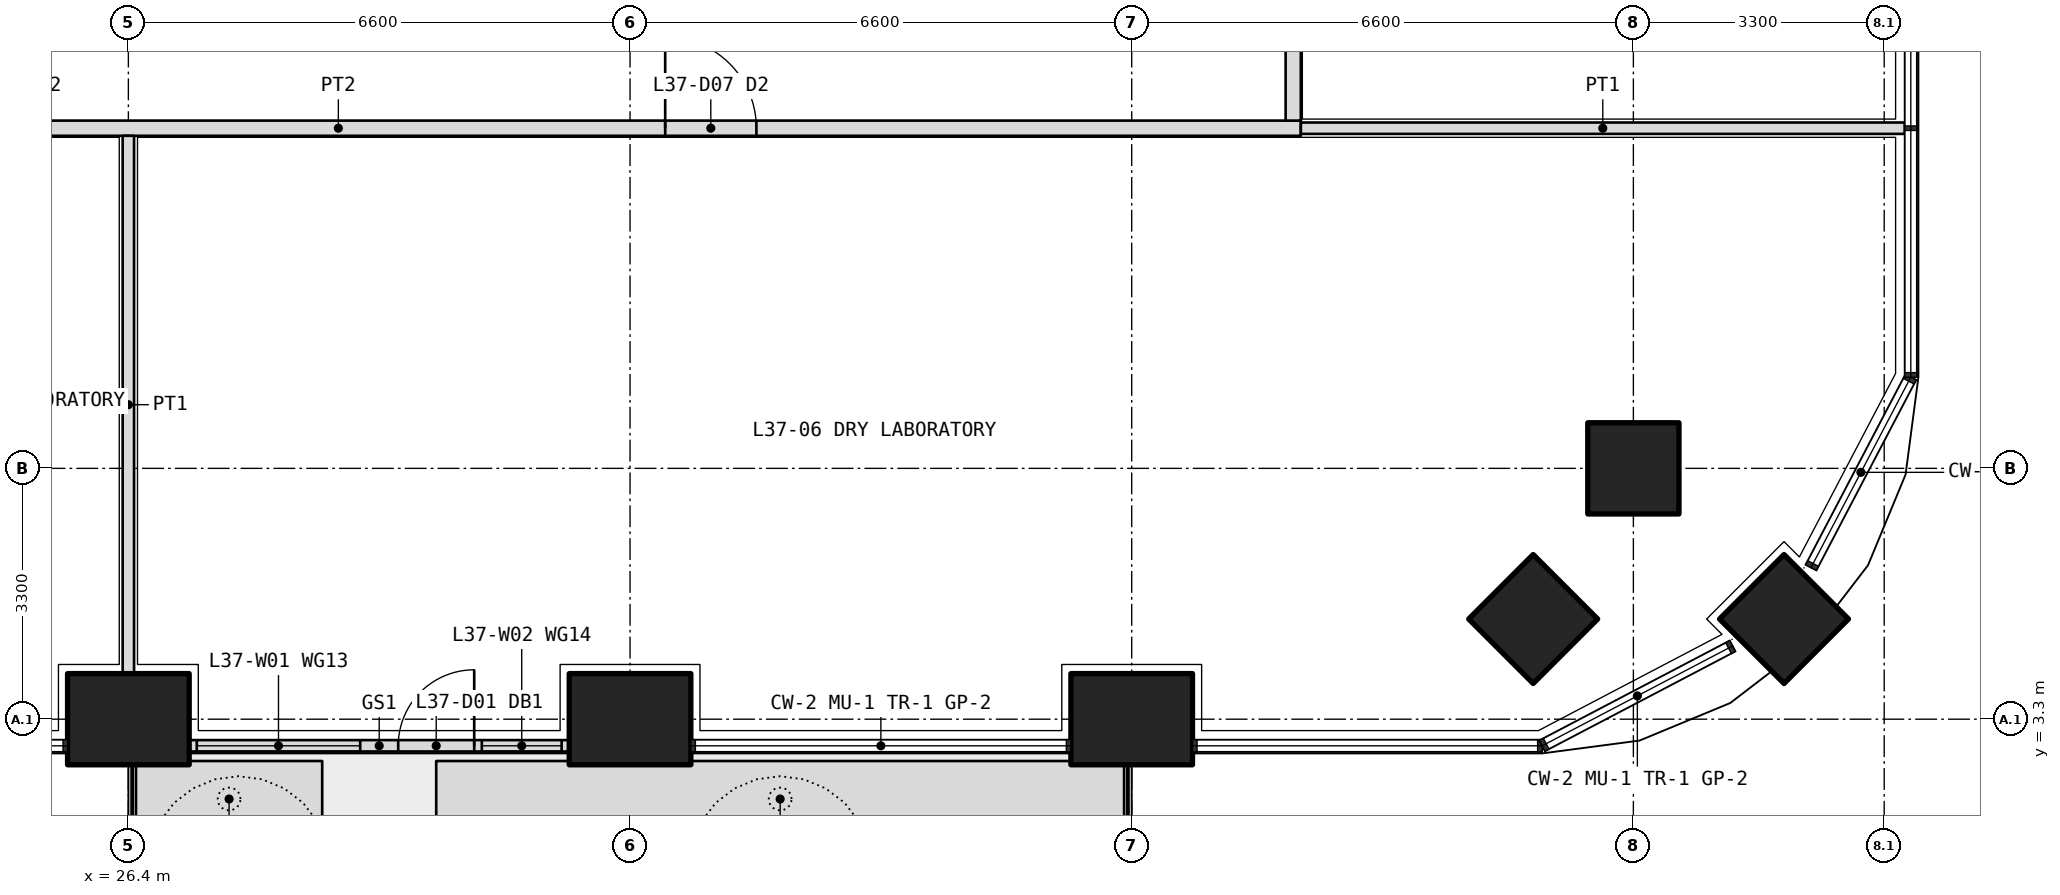
"""IFC4 building model, lengths in metres.
Left out: names, types, materials, properties, quantities, classifications, styles, units other than length and angle.
Written with IfcOpenShell. Run it as: python <this file> out.ifc"""

import sys

from ifc_helpers import new_model, si_unit, direction, frame, frame_2d, origin, origin_2d, place, context, subcontext, project, spatial, polyline, rectangle, outline, extrude, element, fill, save


model = new_model("IFC4")
c1 = context("Model", 3, precision=1e-05, world=origin(), true_north=direction((0.0, 1.0)))
c2 = subcontext(c1, "Body", "Model", "MODEL_VIEW")
j1 = project(units=[si_unit("LENGTHUNIT", "METRE"), si_unit("PLANEANGLEUNIT", "RADIAN")], contexts=[c1])
p1 = place(None, origin())
s1 = spatial("IfcSite", under=j1, at=p1, CompositionType="ELEMENT")
p2 = place(p1, origin())
s2 = spatial("IfcBuilding", under=s1, at=p2, CompositionType="ELEMENT")
p3 = place(p2, frame((0.0, 0.0, 164.1)))
s3 = spatial("IfcBuildingStorey", under=s2, at=p3, CompositionType="ELEMENT", Elevation=164.1)
p4 = place(p3, frame((48.182, 4.618, 0.0), z_axis=(0.0, 0.0, 1.0), x_axis=(0.707106781187, 0.707106781187, 0.0)))
e1 = element("IfcColumn", 1, at=p4, inside=s3, PredefinedType="COLUMN", context=c2, shape_type="SweptSolid", body=[
    extrude(rectangle(XDim=1.2, YDim=1.2, at=origin_2d()), origin(), (0.0, 0.0, 1.0), 4.2),
])
for number, where, z_axis, x_axis in (
    (2, (26.4, 3.3, 0.0), (0.0, 0.0, 1.0), (1.0, 0.0, 0.0)),
    (3, (33.0, 3.3, 0.0), (0.0, 0.0, 1.0), (1.0, 0.0, 0.0)),
    (4, (39.6, 3.3, 0.0), (0.0, 0.0, 1.0), (1.0, 0.0, 0.0)),
):
    element("IfcColumn", number, at=place(p3, frame(where, z_axis=z_axis, x_axis=x_axis)), inside=s3, PredefinedType="COLUMN", context=c2, shape_type="SweptSolid", body=[
        extrude(rectangle(XDim=1.6, YDim=1.2, at=origin_2d()), origin(), (0.0, 0.0, 1.0), 4.2),
    ])
for number, where, z_axis, x_axis in (
    (5, (46.2, 6.6, 0.0), (0.0, 0.0, 1.0), (1.0, 0.0, 0.0)),
    (6, (44.882, 4.618, 0.0), (0.0, 0.0, 1.0), (0.707, 0.707, 0.0)),
):
    element("IfcColumn", number, at=place(p3, frame(where, z_axis=z_axis, x_axis=x_axis)), inside=s3, PredefinedType="COLUMN", context=c2, shape_type="SweptSolid", body=[
        extrude(rectangle(XDim=1.2, YDim=1.2, at=origin_2d()), origin(), (0.0, 0.0, 1.0), 4.2),
    ])
p5 = place(p3, origin())
e7 = element("IfcWall", 7, at=p5, inside=s3, PredefinedType="USERDEFINED", context=c2, shape_type="SweptSolid", body=[
    extrude(outline(polyline([(26.5, 1.75), (28.95, 1.75), (28.95, 2.75), (26.5, 2.75), (26.5, 1.75)]), holes=[polyline([(26.65, 1.9), (28.8, 1.9), (28.8, 2.6), (26.65, 2.6), (26.65, 1.9)])]), origin(), (0.0, 0.0, 1.0), 1.05),
])
p6 = place(p3, origin())
e8 = element("IfcWall", 8, at=p6, inside=s3, PredefinedType="USERDEFINED", context=c2, shape_type="SweptSolid", body=[
    extrude(outline(polyline([(30.45, 1.75), (39.5, 1.75), (39.5, 2.75), (30.45, 2.75), (30.45, 1.75)]), holes=[polyline([(30.6, 1.9), (39.35, 1.9), (39.35, 2.6), (30.6, 2.6), (30.6, 1.9)])]), origin(), (0.0, 0.0, 1.0), 1.05),
])
p7 = place(p3, frame((27.2, 2.95, 0.0), z_axis=(0.0, 0.0, 1.0), x_axis=(1.0, 0.0, 0.0)))
e9 = element("IfcWall", 9, at=p7, inside=s3, PredefinedType="SOLIDWALL", context=c2, shape_type="SweptSolid", body=[
    extrude(rectangle(XDim=5.0, YDim=0.15, at=frame_2d((2.5, 0.0))), origin(), (0.0, 0.0, 1.0), 2.7),
])
p8 = place(p7, frame((2.75, 0.0, 0.0)))
e10 = element("IfcOpeningElement", 10, at=p8, cuts=e9, PredefinedType="OPENING", context=c2, shape_type="SweptSolid", body=[
    extrude(rectangle(XDim=1.0, YDim=2.4, at=frame_2d((0.5, 1.2))), frame((0.0, 0.085, 0.0), z_axis=(0.0, -1.0, 0.0), x_axis=(1.0, 0.0, 0.0)), (0.0, 0.0, 1.0), 0.17),
])
p9 = place(p7, frame((0.1, 0.0, 0.1)))
e11 = element("IfcOpeningElement", 11, at=p9, cuts=e9, PredefinedType="OPENING", context=c2, shape_type="SweptSolid", body=[
    extrude(rectangle(XDim=2.15, YDim=2.3, at=frame_2d((1.075, 1.15))), frame((0.0, 0.085, 0.0), z_axis=(0.0, -1.0, 0.0), x_axis=(1.0, 0.0, 0.0)), (0.0, 0.0, 1.0), 0.17),
])
p10 = place(p7, frame((3.85, 0.0, 0.1)))
e12 = element("IfcOpeningElement", 12, at=p10, cuts=e9, PredefinedType="OPENING", context=c2, shape_type="SweptSolid", body=[
    extrude(rectangle(XDim=1.05, YDim=2.3, at=frame_2d((0.525, 1.15))), frame((0.0, 0.085, 0.0), z_axis=(0.0, -1.0, 0.0), x_axis=(1.0, 0.0, 0.0)), (0.0, 0.0, 1.0), 0.17),
])
p11 = place(p3, frame((16.5, 11.075, 0.0), z_axis=(0.0, 0.0, 1.0), x_axis=(1.0, 0.0, 0.0)))
e13 = element("IfcWall", 13, at=p11, inside=s3, PredefinedType="PARTITIONING", context=c2, shape_type="SweptSolid", body=[
    extrude(rectangle(XDim=25.325, YDim=0.2, at=frame_2d((12.663, 0.0))), origin(), (0.0, 0.0, 1.0), 2.85),
])
p12 = place(p11, frame((1.6, 0.0, 0.0)))
e14 = element("IfcOpeningElement", 14, at=p12, cuts=e13, PredefinedType="OPENING", context=c2, shape_type="SweptSolid", body=[
    extrude(rectangle(XDim=1.0, YDim=2.1, at=frame_2d((0.5, 1.05))), frame((0.0, 0.11, 0.0), z_axis=(0.0, -1.0, 0.0), x_axis=(1.0, 0.0, 0.0)), (0.0, 0.0, 1.0), 0.22),
])
p13 = place(p11, frame((4.9, 0.0, 0.0)))
e15 = element("IfcOpeningElement", 15, at=p13, cuts=e13, PredefinedType="OPENING", context=c2, shape_type="SweptSolid", body=[
    extrude(rectangle(XDim=1.0, YDim=2.1, at=frame_2d((0.5, 1.05))), frame((0.0, 0.11, 0.0), z_axis=(0.0, -1.0, 0.0), x_axis=(1.0, 0.0, 0.0)), (0.0, 0.0, 1.0), 0.22),
])
p14 = place(p11, frame((7.65, 0.0, 0.0)))
e16 = element("IfcOpeningElement", 16, at=p14, cuts=e13, PredefinedType="OPENING", context=c2, shape_type="SweptSolid", body=[
    extrude(rectangle(XDim=1.2, YDim=2.1, at=frame_2d((0.6, 1.05))), frame((0.0, 0.11, 0.0), z_axis=(0.0, -1.0, 0.0), x_axis=(1.0, 0.0, 0.0)), (0.0, 0.0, 1.0), 0.22),
])
p15 = place(p11, frame((16.962, 0.0, 0.0)))
e17 = element("IfcOpeningElement", 17, at=p15, cuts=e13, PredefinedType="OPENING", context=c2, shape_type="SweptSolid", body=[
    extrude(rectangle(XDim=1.2, YDim=2.1, at=frame_2d((0.6, 1.05))), frame((0.0, 0.11, 0.0), z_axis=(0.0, -1.0, 0.0), x_axis=(1.0, 0.0, 0.0)), (0.0, 0.0, 1.0), 0.22),
])
p16 = place(p3, frame((41.725, 11.175, 0.0), z_axis=(0.0, 0.0, 1.0), x_axis=(0.0, 1.0, 0.0)))
e18 = element("IfcWall", 18, at=p16, inside=s3, PredefinedType="PARTITIONING", context=c2, shape_type="SweptSolid", body=[
    extrude(rectangle(XDim=23.85, YDim=0.2, at=frame_2d((11.925, 0.0))), origin(), (0.0, 0.0, 1.0), 2.85),
])
p17 = place(p16, frame((3.762, 0.0, 0.0)))
e19 = element("IfcOpeningElement", 19, at=p17, cuts=e18, PredefinedType="OPENING", context=c2, shape_type="SweptSolid", body=[
    extrude(rectangle(XDim=1.0, YDim=2.1, at=frame_2d((0.5, 1.05))), frame((0.0, 0.11, 0.0), z_axis=(0.0, -1.0, 0.0), x_axis=(1.0, 0.0, 0.0)), (0.0, 0.0, 1.0), 0.22),
])
p18 = place(p16, frame((9.625, 0.0, 0.0)))
e20 = element("IfcOpeningElement", 20, at=p18, cuts=e18, PredefinedType="OPENING", context=c2, shape_type="SweptSolid", body=[
    extrude(rectangle(XDim=1.0, YDim=2.1, at=frame_2d((0.5, 1.05))), frame((0.0, 0.11, 0.0), z_axis=(0.0, -1.0, 0.0), x_axis=(1.0, 0.0, 0.0)), (0.0, 0.0, 1.0), 0.22),
])
p19 = place(p16, frame((12.975, 0.0, 0.0)))
e21 = element("IfcOpeningElement", 21, at=p19, cuts=e18, PredefinedType="OPENING", context=c2, shape_type="SweptSolid", body=[
    extrude(rectangle(XDim=0.9, YDim=2.1, at=frame_2d((0.45, 1.05))), frame((0.0, 0.11, 0.0), z_axis=(0.0, -1.0, 0.0), x_axis=(1.0, 0.0, 0.0)), (0.0, 0.0, 1.0), 0.22),
])
p20 = place(p16, frame((19.087, 0.0, 0.0)))
e22 = element("IfcOpeningElement", 22, at=p20, cuts=e18, PredefinedType="OPENING", context=c2, shape_type="SweptSolid", body=[
    extrude(rectangle(XDim=1.0, YDim=2.1, at=frame_2d((0.5, 1.05))), frame((0.0, 0.11, 0.0), z_axis=(0.0, -1.0, 0.0), x_axis=(1.0, 0.0, 0.0)), (0.0, 0.0, 1.0), 0.22),
])
p21 = place(p3, frame((49.77, 11.075, 0.0), z_axis=(0.0, 0.0, 1.0), x_axis=(-1.0, 0.0, 0.0)))
e23 = element("IfcWall", 23, at=p21, inside=s3, PredefinedType="PARTITIONING", context=c2, shape_type="SweptSolid", body=[
    extrude(rectangle(XDim=7.945, YDim=0.15, at=frame_2d((3.973, 0.0))), origin(), (0.0, 0.0, 1.0), 2.7),
])
p22 = place(p3, frame((26.4, 3.9, 0.0), z_axis=(0.0, 0.0, 1.0), x_axis=(0.0, 1.0, 0.0)))
e24 = element("IfcWall", 24, at=p22, inside=s3, PredefinedType="PARTITIONING", context=c2, shape_type="SweptSolid", body=[
    extrude(rectangle(XDim=7.075, YDim=0.15, at=frame_2d((3.538, 0.0))), origin(), (0.0, 0.0, 1.0), 2.85),
])
p23 = place(p8, origin())
e25 = element("IfcDoor", 25, at=p23, inside=s3, OperationType="SINGLE_SWING_RIGHT", PredefinedType="DOOR", context=c2, shape_type="SweptSolid", body=[
    extrude(rectangle(XDim=1.0, YDim=2.4, at=frame_2d((0.5, 1.2))), frame((0.0, 0.025, 0.0), z_axis=(0.0, -1.0, 0.0), x_axis=(1.0, 0.0, 0.0)), (0.0, 0.0, 1.0), 0.05),
])
fill(e10, e25)
p24 = place(p9, origin())
e26 = element("IfcWindow", 26, at=p24, inside=s3, PartitioningType="SINGLE_PANEL", PredefinedType="WINDOW", context=c2, shape_type="SweptSolid", body=[
    extrude(rectangle(XDim=2.15, YDim=2.3, at=frame_2d((1.075, 1.15))), frame((0.0, 0.03, 0.0), z_axis=(0.0, -1.0, 0.0), x_axis=(1.0, 0.0, 0.0)), (0.0, 0.0, 1.0), 0.06),
])
fill(e11, e26)
p25 = place(p10, origin())
e27 = element("IfcWindow", 27, at=p25, inside=s3, PartitioningType="SINGLE_PANEL", PredefinedType="WINDOW", context=c2, shape_type="SweptSolid", body=[
    extrude(rectangle(XDim=1.05, YDim=2.3, at=frame_2d((0.525, 1.15))), frame((0.0, 0.03, 0.0), z_axis=(0.0, -1.0, 0.0), x_axis=(1.0, 0.0, 0.0)), (0.0, 0.0, 1.0), 0.06),
])
fill(e12, e27)
p26 = place(p15, origin())
e28 = element("IfcDoor", 28, at=p26, inside=s3, OperationType="DOUBLE_DOOR_SINGLE_SWING", PredefinedType="DOOR", context=c2, shape_type="SweptSolid", body=[
    extrude(rectangle(XDim=1.2, YDim=2.1, at=frame_2d((0.6, 1.05))), frame((0.0, 0.025, 0.0), z_axis=(0.0, -1.0, 0.0), x_axis=(1.0, 0.0, 0.0)), (0.0, 0.0, 1.0), 0.05),
])
fill(e17, e28)
save(model, sys.argv[1])
